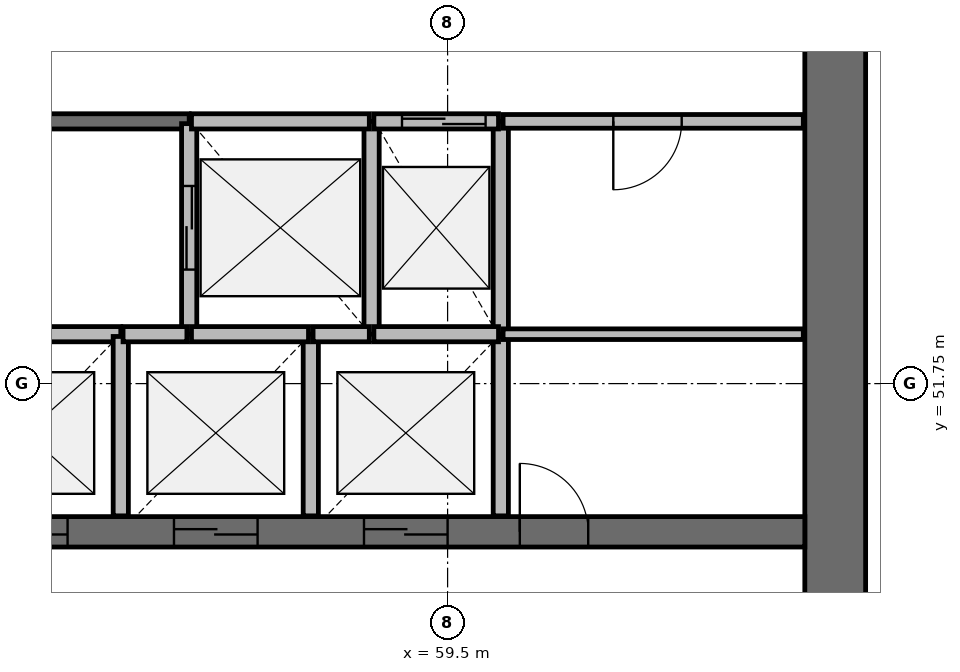
"""IFC4 building model, lengths in metres.
Left out: names, types, materials, properties, quantities, classifications, styles, units other than length and angle.
Written with IfcOpenShell. Run it as: python <this file> out.ifc"""

import sys

from ifc_helpers import new_model, si_unit, direction, frame, frame_2d, origin, place, context, subcontext, project, spatial, rectangle, extrude, source, transform, mapped, element, fill, save


model = new_model("IFC4")
c1 = context("Model", 3, precision=1e-05, world=origin(), true_north=direction((0.0, 1.0)))
c2 = subcontext(c1, "Body", "Model", "MODEL_VIEW")
j1 = project(units=[si_unit("LENGTHUNIT", "METRE"), si_unit("PLANEANGLEUNIT", "RADIAN")], contexts=[c1])
p1 = place(None, origin())
s1 = spatial("IfcSite", under=j1, at=p1, CompositionType="ELEMENT")
p2 = place(p1, origin())
s2 = spatial("IfcBuilding", under=s1, at=p2, CompositionType="ELEMENT")
p3 = place(p2, frame((0.0, 0.0, 133.1)))
s3 = spatial("IfcBuildingStorey", under=s2, at=p3, CompositionType="ELEMENT", Elevation=133.1)
p4 = place(p3, frame((64.6, 38.0, 0.0), z_axis=(0.0, 0.0, 1.0), x_axis=(0.0, 1.0, 0.0)))
e1 = element("IfcWall", 1, at=p4, inside=s3, PredefinedType="SHEAR", context=c2, shape_type="SweptSolid", body=[
    extrude(rectangle(XDim=20.0, YDim=0.8, at=frame_2d((10.0, 0.0))), origin(), (0.0, 0.0, 1.0), 3.9),
])
p5 = place(p4, frame((9.1, 0.0, 0.0)))
e2 = element("IfcOpeningElement", 2, at=p5, cuts=e1, PredefinedType="OPENING", context=c2, shape_type="SweptSolid", body=[
    extrude(rectangle(XDim=1.8, YDim=2.1, at=frame_2d((0.9, 1.05))), frame((0.0, 0.41, 0.0), z_axis=(0.0, -1.0, 0.0), x_axis=(1.0, 0.0, 0.0)), (0.0, 0.0, 1.0), 0.82),
])
p6 = place(p3, frame((39.8, 49.8, 0.0), z_axis=(0.0, 0.0, 1.0), x_axis=(1.0, 0.0, 0.0)))
e3 = element("IfcWall", 3, at=p6, inside=s3, PredefinedType="SHEAR", context=c2, shape_type="SweptSolid", body=[
    extrude(rectangle(XDim=24.4, YDim=0.4, at=frame_2d((12.2, 0.0))), origin(), (0.0, 0.0, 1.0), 3.9),
])
p7 = place(p6, frame((13.6, 0.0, 0.0)))
e4 = element("IfcOpeningElement", 4, at=p7, cuts=e3, PredefinedType="OPENING", context=c2, shape_type="SweptSolid", body=[
    extrude(rectangle(XDim=1.1, YDim=2.1, at=frame_2d((0.55, 1.05))), frame((0.0, 0.21, 0.0), z_axis=(0.0, -1.0, 0.0), x_axis=(1.0, 0.0, 0.0)), (0.0, 0.0, 1.0), 0.42),
])
p8 = place(p6, frame((16.1, 0.0, 0.0)))
e5 = element("IfcOpeningElement", 5, at=p8, cuts=e3, PredefinedType="OPENING", context=c2, shape_type="SweptSolid", body=[
    extrude(rectangle(XDim=1.1, YDim=2.1, at=frame_2d((0.55, 1.05))), frame((0.0, 0.21, 0.0), z_axis=(0.0, -1.0, 0.0), x_axis=(1.0, 0.0, 0.0)), (0.0, 0.0, 1.0), 0.42),
])
p9 = place(p6, frame((18.6, 0.0, 0.0)))
e6 = element("IfcOpeningElement", 6, at=p9, cuts=e3, PredefinedType="OPENING", context=c2, shape_type="SweptSolid", body=[
    extrude(rectangle(XDim=1.1, YDim=2.1, at=frame_2d((0.55, 1.05))), frame((0.0, 0.21, 0.0), z_axis=(0.0, -1.0, 0.0), x_axis=(1.0, 0.0, 0.0)), (0.0, 0.0, 1.0), 0.42),
])
p10 = place(p6, frame((4.7, 0.0, 0.0)))
e7 = element("IfcOpeningElement", 7, at=p10, cuts=e3, PredefinedType="OPENING", context=c2, shape_type="SweptSolid", body=[
    extrude(rectangle(XDim=1.1, YDim=2.1, at=frame_2d((0.55, 1.05))), frame((0.0, 0.21, 0.0), z_axis=(0.0, -1.0, 0.0), x_axis=(1.0, 0.0, 0.0)), (0.0, 0.0, 1.0), 0.42),
])
p11 = place(p6, frame((7.2, 0.0, 0.0)))
e8 = element("IfcOpeningElement", 8, at=p11, cuts=e3, PredefinedType="OPENING", context=c2, shape_type="SweptSolid", body=[
    extrude(rectangle(XDim=1.1, YDim=2.1, at=frame_2d((0.55, 1.05))), frame((0.0, 0.21, 0.0), z_axis=(0.0, -1.0, 0.0), x_axis=(1.0, 0.0, 0.0)), (0.0, 0.0, 1.0), 0.42),
])
p12 = place(p6, frame((9.7, 0.0, 0.0)))
e9 = element("IfcOpeningElement", 9, at=p12, cuts=e3, PredefinedType="OPENING", context=c2, shape_type="SweptSolid", body=[
    extrude(rectangle(XDim=1.1, YDim=2.1, at=frame_2d((0.55, 1.05))), frame((0.0, 0.21, 0.0), z_axis=(0.0, -1.0, 0.0), x_axis=(1.0, 0.0, 0.0)), (0.0, 0.0, 1.0), 0.42),
])
p13 = place(p6, frame((20.65, 0.0, 0.0)))
e10 = element("IfcOpeningElement", 10, at=p13, cuts=e3, PredefinedType="OPENING", context=c2, shape_type="SweptSolid", body=[
    extrude(rectangle(XDim=0.9, YDim=2.1, at=frame_2d((0.45, 1.05))), frame((0.0, 0.21, 0.0), z_axis=(0.0, -1.0, 0.0), x_axis=(1.0, 0.0, 0.0)), (0.0, 0.0, 1.0), 0.42),
])
p14 = place(p6, frame((11.85, 0.0, 0.0)))
e11 = element("IfcOpeningElement", 11, at=p14, cuts=e3, PredefinedType="OPENING", context=c2, shape_type="SweptSolid", body=[
    extrude(rectangle(XDim=0.9, YDim=2.1, at=frame_2d((0.45, 1.05))), frame((0.0, 0.21, 0.0), z_axis=(0.0, -1.0, 0.0), x_axis=(1.0, 0.0, 0.0)), (0.0, 0.0, 1.0), 0.42),
])
p15 = place(p3, frame((56.1, 55.2, 0.0), z_axis=(0.0, 0.0, 1.0), x_axis=(-1.0, 0.0, 0.0)))
e12 = element("IfcWall", 12, at=p15, inside=s3, PredefinedType="SOLIDWALL", context=c2, shape_type="SweptSolid", body=[
    extrude(rectangle(XDim=5.67, YDim=0.2, at=frame_2d((2.835, 0.0))), origin(), (0.0, 0.0, 1.0), 3.58),
])
p16 = place(p15, frame((2.95, 0.0, 0.0)))
e13 = element("IfcOpeningElement", 13, at=p16, cuts=e12, PredefinedType="OPENING", context=c2, shape_type="SweptSolid", body=[
    extrude(rectangle(XDim=1.1, YDim=2.1, at=frame_2d((0.55, 1.05))), frame((0.0, 0.11, 0.0), z_axis=(0.0, -1.0, 0.0), x_axis=(1.0, 0.0, 0.0)), (0.0, 0.0, 1.0), 0.22),
])
p17 = place(p3, frame((56.1, 55.17, 0.0), z_axis=(0.0, 0.0, 1.0), x_axis=(0.0, -1.0, 0.0)))
e14 = element("IfcWall", 14, at=p17, inside=s3, PredefinedType="SOLIDWALL", context=c2, shape_type="SweptSolid", body=[
    extrude(rectangle(XDim=2.77, YDim=0.2, at=frame_2d((1.385, 0.0))), origin(), (0.0, 0.0, 1.0), 3.58),
])
p18 = place(p17, frame((0.82, 0.0, 0.0)))
e15 = element("IfcOpeningElement", 15, at=p18, cuts=e14, PredefinedType="OPENING", context=c2, shape_type="SweptSolid", body=[
    extrude(rectangle(XDim=1.1, YDim=2.1, at=frame_2d((0.55, 1.05))), frame((0.0, 0.11, 0.0), z_axis=(0.0, -1.0, 0.0), x_axis=(1.0, 0.0, 0.0)), (0.0, 0.0, 1.0), 0.22),
])
for number, where, z_axis, x_axis in (
    (16, (58.5, 52.4, 0.0), (0.0, 0.0, 1.0), (0.0, 1.0, 0.0)),
    (17, (60.2, 52.4, 0.0), (0.0, 0.0, 1.0), (0.0, 1.0, 0.0)),
):
    element("IfcWall", number, at=place(p3, frame(where, z_axis=z_axis, x_axis=x_axis)), inside=s3, PredefinedType="SOLIDWALL", context=c2, shape_type="SweptSolid", body=[
        extrude(rectangle(XDim=2.8, YDim=0.2, at=frame_2d((1.4, 0.0))), origin(), (0.0, 0.0, 1.0), 3.58),
    ])
p19 = place(p3, frame((55.2, 52.4, 0.0), z_axis=(0.0, 0.0, 1.0), x_axis=(-1.0, 0.0, 0.0)))
e18 = element("IfcWall", 18, at=p19, inside=s3, PredefinedType="SOLIDWALL", context=c2, shape_type="SweptSolid", body=[
    extrude(rectangle(XDim=2.5, YDim=0.2, at=frame_2d((1.25, 0.0))), origin(), (0.0, 0.0, 1.0), 3.58),
])
p20 = place(p3, frame((58.47, 55.2, 0.0), z_axis=(0.0, 0.0, 1.0), x_axis=(-1.0, 0.0, 0.0)))
e19 = element("IfcWall", 19, at=p20, inside=s3, PredefinedType="SOLIDWALL", context=c2, shape_type="SweptSolid", body=[
    extrude(rectangle(XDim=2.34, YDim=0.2, at=frame_2d((1.17, 0.0))), origin(), (0.0, 0.0, 1.0), 3.58),
])
p21 = place(p3, frame((55.2, 50.01, 0.0), z_axis=(0.0, 0.0, 1.0), x_axis=(0.0, 1.0, 0.0)))
e20 = element("IfcWall", 20, at=p21, inside=s3, PredefinedType="SOLIDWALL", context=c2, shape_type="SweptSolid", body=[
    extrude(rectangle(XDim=2.36, YDim=0.2, at=frame_2d((1.18, 0.0))), origin(), (0.0, 0.0, 1.0), 3.58),
])
p22 = place(p3, frame((57.7, 50.01, 0.0), z_axis=(0.0, 0.0, 1.0), x_axis=(0.0, 1.0, 0.0)))
e21 = element("IfcWall", 21, at=p22, inside=s3, PredefinedType="SOLIDWALL", context=c2, shape_type="SweptSolid", body=[
    extrude(rectangle(XDim=2.39, YDim=0.2, at=frame_2d((1.195, 0.0))), origin(), (0.0, 0.0, 1.0), 3.58),
])
p23 = place(p3, frame((60.2, 50.01, 0.0), z_axis=(0.0, 0.0, 1.0), x_axis=(0.0, 1.0, 0.0)))
e22 = element("IfcWall", 22, at=p23, inside=s3, PredefinedType="SOLIDWALL", context=c2, shape_type="SweptSolid", body=[
    extrude(rectangle(XDim=2.36, YDim=0.2, at=frame_2d((1.18, 0.0))), origin(), (0.0, 0.0, 1.0), 3.58),
])
p24 = place(p3, frame((60.17, 52.4, 0.0), z_axis=(0.0, 0.0, 1.0), x_axis=(-1.0, 0.0, 0.0)))
e23 = element("IfcWall", 23, at=p24, inside=s3, PredefinedType="SOLIDWALL", context=c2, shape_type="SweptSolid", body=[
    extrude(rectangle(XDim=1.64, YDim=0.2, at=frame_2d((0.82, 0.0))), origin(), (0.0, 0.0, 1.0), 3.58),
])
p25 = place(p3, frame((60.17, 55.2, 0.0), z_axis=(0.0, 0.0, 1.0), x_axis=(-1.0, 0.0, 0.0)))
e24 = element("IfcWall", 24, at=p25, inside=s3, PredefinedType="SOLIDWALL", context=c2, shape_type="SweptSolid", body=[
    extrude(rectangle(XDim=1.64, YDim=0.2, at=frame_2d((0.82, 0.0))), origin(), (0.0, 0.0, 1.0), 3.58),
])
p26 = place(p25, frame((0.17, 0.0, 0.0)))
e25 = element("IfcOpeningElement", 25, at=p26, cuts=e24, PredefinedType="OPENING", context=c2, shape_type="SweptSolid", body=[
    extrude(rectangle(XDim=1.1, YDim=2.1, at=frame_2d((0.55, 1.05))), frame((0.0, 0.11, 0.0), z_axis=(0.0, -1.0, 0.0), x_axis=(1.0, 0.0, 0.0)), (0.0, 0.0, 1.0), 0.22),
])
p27 = place(p3, frame((57.67, 52.4, 0.0), z_axis=(0.0, 0.0, 1.0), x_axis=(-1.0, 0.0, 0.0)))
e26 = element("IfcWall", 26, at=p27, inside=s3, PredefinedType="SOLIDWALL", context=c2, shape_type="SweptSolid", body=[
    extrude(rectangle(XDim=1.54, YDim=0.2, at=frame_2d((0.77, 0.0))), origin(), (0.0, 0.0, 1.0), 3.58),
])
p28 = place(p3, frame((56.07, 52.4, 0.0), z_axis=(0.0, 0.0, 1.0), x_axis=(-1.0, 0.0, 0.0)))
e27 = element("IfcWall", 27, at=p28, inside=s3, PredefinedType="SOLIDWALL", context=c2, shape_type="SweptSolid", body=[
    extrude(rectangle(XDim=0.84, YDim=0.2, at=frame_2d((0.42, 0.0))), origin(), (0.0, 0.0, 1.0), 3.58),
])
p29 = place(p3, frame((58.47, 52.4, 0.0), z_axis=(0.0, 0.0, 1.0), x_axis=(-1.0, 0.0, 0.0)))
e28 = element("IfcWall", 28, at=p29, inside=s3, PredefinedType="SOLIDWALL", context=c2, shape_type="SweptSolid", body=[
    extrude(rectangle(XDim=0.74, YDim=0.2, at=frame_2d((0.37, 0.0))), origin(), (0.0, 0.0, 1.0), 3.58),
])
p30 = place(p3, frame((64.18, 55.2, 0.0), z_axis=(0.0, 0.0, 1.0), x_axis=(-1.0, 0.0, 0.0)))
e29 = element("IfcWall", 29, at=p30, inside=s3, PredefinedType="PARTITIONING", context=c2, shape_type="SweptSolid", body=[
    extrude(rectangle(XDim=3.95, YDim=0.18, at=frame_2d((1.975, 0.0))), origin(), (0.0, 0.0, 1.0), 3.58),
])
p31 = place(p30, frame((1.6, 0.0, 0.0)))
e30 = element("IfcOpeningElement", 30, at=p31, cuts=e29, PredefinedType="OPENING", context=c2, shape_type="SweptSolid", body=[
    extrude(rectangle(XDim=0.9, YDim=2.1, at=frame_2d((0.45, 1.05))), frame((0.0, 0.1, 0.0), z_axis=(0.0, -1.0, 0.0), x_axis=(1.0, 0.0, 0.0)), (0.0, 0.0, 1.0), 0.2),
])
p32 = place(p3, frame((64.18, 52.4, 0.0), z_axis=(0.0, 0.0, 1.0), x_axis=(-1.0, 0.0, 0.0)))
e31 = element("IfcWall", 31, at=p32, inside=s3, PredefinedType="PARTITIONING", context=c2, shape_type="SweptSolid", body=[
    extrude(rectangle(XDim=3.95, YDim=0.14, at=frame_2d((1.975, 0.0))), origin(), (0.0, 0.0, 1.0), 2.88),
])
m1 = source(origin(), c2, "Body", "SweptSolid", [
    extrude(rectangle(XDim=1.1, YDim=2.1, at=frame_2d((0.55, 1.05))), frame((0.0, 0.025, 0.0), z_axis=(0.0, -1.0, 0.0), x_axis=(1.0, 0.0, 0.0)), (0.0, 0.0, 1.0), 0.05),
])
p33 = place(p7, origin())
e32 = element("IfcDoor", 32, at=p33, inside=s3, OperationType="DOUBLE_DOOR_SLIDING", PredefinedType="USERDEFINED", context=c2, shape_type="MappedRepresentation", body=[
    mapped(m1, transform((0.0, 0.0, 0.0), scale=1.0)),
])
fill(e4, e32)
p34 = place(p8, origin())
e33 = element("IfcDoor", 33, at=p34, inside=s3, OperationType="DOUBLE_DOOR_SLIDING", PredefinedType="USERDEFINED", context=c2, shape_type="MappedRepresentation", body=[
    mapped(m1, transform((0.0, 0.0, 0.0), scale=1.0)),
])
fill(e5, e33)
p35 = place(p9, origin())
e34 = element("IfcDoor", 34, at=p35, inside=s3, OperationType="DOUBLE_DOOR_SLIDING", PredefinedType="USERDEFINED", context=c2, shape_type="MappedRepresentation", body=[
    mapped(m1, transform((0.0, 0.0, 0.0), scale=1.0)),
])
fill(e6, e34)
p36 = place(p18, origin())
e35 = element("IfcDoor", 35, at=p36, inside=s3, OperationType="DOUBLE_DOOR_SLIDING", PredefinedType="USERDEFINED", context=c2, shape_type="MappedRepresentation", body=[
    mapped(m1, transform((0.0, 0.0, 0.0), scale=1.0)),
])
fill(e15, e35)
p37 = place(p26, origin())
e36 = element("IfcDoor", 36, at=p37, inside=s3, OperationType="DOUBLE_DOOR_SLIDING", PredefinedType="USERDEFINED", context=c2, shape_type="MappedRepresentation", body=[
    mapped(m1, transform((0.0, 0.0, 0.0), scale=1.0)),
])
fill(e25, e36)
m2 = source(origin(), c2, "Body", "SweptSolid", [
    extrude(rectangle(XDim=0.9, YDim=2.1, at=frame_2d((0.45, 1.05))), frame((0.0, 0.025, 0.0), z_axis=(0.0, -1.0, 0.0), x_axis=(1.0, 0.0, 0.0)), (0.0, 0.0, 1.0), 0.05),
])
p38 = place(p13, origin())
e37 = element("IfcDoor", 37, at=p38, inside=s3, OperationType="SINGLE_SWING_LEFT", PredefinedType="DOOR", context=c2, shape_type="MappedRepresentation", body=[
    mapped(m2, transform((0.0, 0.0, 0.0), scale=1.0)),
])
fill(e10, e37)
p39 = place(p31, origin())
e38 = element("IfcDoor", 38, at=p39, inside=s3, OperationType="SINGLE_SWING_RIGHT", PredefinedType="DOOR", context=c2, shape_type="MappedRepresentation", body=[
    mapped(m2, transform((0.0, 0.0, 0.0), scale=1.0)),
])
fill(e30, e38)
save(model, sys.argv[1])
